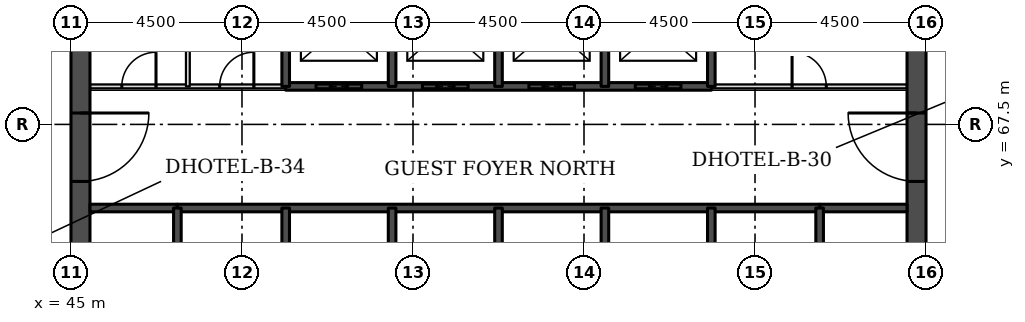
"""IFC4 building model, lengths in metres.
Left out: names, types, materials, properties, quantities, classifications, styles, units other than length and angle.
Written with IfcOpenShell. Run it as: python <this file> out.ifc"""

import sys

from ifc_helpers import new_model, si_unit, direction, frame, frame_2d, origin, place, context, subcontext, project, spatial, rectangle, extrude, element, fill, save


model = new_model("IFC4")
c1 = context("Model", 3, precision=1e-05, world=origin(), true_north=direction((0.0, 1.0)))
c2 = subcontext(c1, "Body", "Model", "MODEL_VIEW")
j1 = project(units=[si_unit("LENGTHUNIT", "METRE"), si_unit("PLANEANGLEUNIT", "RADIAN")], contexts=[c1])
p1 = place(None, origin())
s1 = spatial("IfcSite", under=j1, at=p1, CompositionType="ELEMENT")
p2 = place(p1, origin())
s2 = spatial("IfcBuilding", under=s1, at=p2, CompositionType="ELEMENT")
p3 = place(p2, frame((0.0, 0.0, 52.8)))
s3 = spatial("IfcBuildingStorey", under=s2, at=p3, CompositionType="ELEMENT", Elevation=52.8)
p4 = place(p3, frame((45.25, 49.5, 0.0), z_axis=(0.0, 0.0, 1.0), x_axis=(0.0, 1.0, 0.0)))
e1 = element("IfcWall", 1, at=p4, inside=s3, PredefinedType="SHEAR", context=c2, shape_type="SweptSolid", body=[
    extrude(rectangle(XDim=22.5, YDim=0.5, at=frame_2d((11.25, 0.0))), origin(), (0.0, 0.0, 1.0), 3.3),
])
p5 = place(p4, frame((4.2, 0.0, 0.0)))
e2 = element("IfcOpeningElement", 2, at=p5, cuts=e1, PredefinedType="OPENING", context=c2, shape_type="SweptSolid", body=[
    extrude(rectangle(XDim=1.8, YDim=2.1, at=frame_2d((0.9, 1.05))), frame((0.0, 0.26, 0.0), z_axis=(0.0, -1.0, 0.0), x_axis=(1.0, 0.0, 0.0)), (0.0, 0.0, 1.0), 0.52),
])
p6 = place(p4, frame((6.9, 0.0, 0.0)))
e3 = element("IfcOpeningElement", 3, at=p6, cuts=e1, PredefinedType="OPENING", context=c2, shape_type="SweptSolid", body=[
    extrude(rectangle(XDim=1.1, YDim=2.1, at=frame_2d((0.55, 1.05))), frame((0.0, 0.26, 0.0), z_axis=(0.0, -1.0, 0.0), x_axis=(1.0, 0.0, 0.0)), (0.0, 0.0, 1.0), 0.52),
])
p7 = place(p4, frame((13.6, 0.0, 0.0)))
e4 = element("IfcOpeningElement", 4, at=p7, cuts=e1, PredefinedType="OPENING", context=c2, shape_type="SweptSolid", body=[
    extrude(rectangle(XDim=1.1, YDim=2.1, at=frame_2d((0.55, 1.05))), frame((0.0, 0.26, 0.0), z_axis=(0.0, -1.0, 0.0), x_axis=(1.0, 0.0, 0.0)), (0.0, 0.0, 1.0), 0.52),
])
p8 = place(p4, frame((16.5, 0.0, 0.0)))
e5 = element("IfcOpeningElement", 5, at=p8, cuts=e1, PredefinedType="OPENING", context=c2, shape_type="SweptSolid", body=[
    extrude(rectangle(XDim=1.8, YDim=2.1, at=frame_2d((0.9, 1.05))), frame((0.0, 0.26, 0.0), z_axis=(0.0, -1.0, 0.0), x_axis=(1.0, 0.0, 0.0)), (0.0, 0.0, 1.0), 0.52),
])
p9 = place(p3, frame((67.25, 49.5, 0.0), z_axis=(0.0, 0.0, 1.0), x_axis=(0.0, 1.0, 0.0)))
e6 = element("IfcWall", 6, at=p9, inside=s3, PredefinedType="SHEAR", context=c2, shape_type="SweptSolid", body=[
    extrude(rectangle(XDim=22.5, YDim=0.5, at=frame_2d((11.25, 0.0))), origin(), (0.0, 0.0, 1.0), 3.3),
])
p10 = place(p9, frame((4.2, 0.0, 0.0)))
e7 = element("IfcOpeningElement", 7, at=p10, cuts=e6, PredefinedType="OPENING", context=c2, shape_type="SweptSolid", body=[
    extrude(rectangle(XDim=1.8, YDim=2.1, at=frame_2d((0.9, 1.05))), frame((0.0, 0.26, 0.0), z_axis=(0.0, -1.0, 0.0), x_axis=(1.0, 0.0, 0.0)), (0.0, 0.0, 1.0), 0.52),
])
p11 = place(p9, frame((6.9, 0.0, 0.0)))
e8 = element("IfcOpeningElement", 8, at=p11, cuts=e6, PredefinedType="OPENING", context=c2, shape_type="SweptSolid", body=[
    extrude(rectangle(XDim=1.1, YDim=2.1, at=frame_2d((0.55, 1.05))), frame((0.0, 0.26, 0.0), z_axis=(0.0, -1.0, 0.0), x_axis=(1.0, 0.0, 0.0)), (0.0, 0.0, 1.0), 0.52),
])
p12 = place(p9, frame((13.6, 0.0, 0.0)))
e9 = element("IfcOpeningElement", 9, at=p12, cuts=e6, PredefinedType="OPENING", context=c2, shape_type="SweptSolid", body=[
    extrude(rectangle(XDim=1.1, YDim=2.1, at=frame_2d((0.55, 1.05))), frame((0.0, 0.26, 0.0), z_axis=(0.0, -1.0, 0.0), x_axis=(1.0, 0.0, 0.0)), (0.0, 0.0, 1.0), 0.52),
])
p13 = place(p9, frame((16.5, 0.0, 0.0)))
e10 = element("IfcOpeningElement", 10, at=p13, cuts=e6, PredefinedType="OPENING", context=c2, shape_type="SweptSolid", body=[
    extrude(rectangle(XDim=1.8, YDim=2.1, at=frame_2d((0.9, 1.05))), frame((0.0, 0.26, 0.0), z_axis=(0.0, -1.0, 0.0), x_axis=(1.0, 0.0, 0.0)), (0.0, 0.0, 1.0), 0.52),
])
for number, where, z_axis, x_axis in (
    (11, (45.5, 65.3, 0.0), (0.0, 0.0, 1.0), (1.0, 0.0, 0.0)),
    (12, (64.7, 65.3, 0.0), (0.0, 0.0, 1.0), (1.0, 0.0, 0.0)),
):
    element("IfcWall", number, at=place(p3, frame(where, z_axis=z_axis, x_axis=x_axis)), inside=s3, PredefinedType="SOLIDWALL", context=c2, shape_type="SweptSolid", body=[
        extrude(rectangle(XDim=2.3, YDim=0.2, at=frame_2d((1.15, 0.0))), origin(), (0.0, 0.0, 1.0), 3.08),
    ])
p14 = place(p3, frame((47.8, 65.3, 0.0), z_axis=(0.0, 0.0, 1.0), x_axis=(1.0, 0.0, 0.0)))
e13 = element("IfcWall", 13, at=p14, inside=s3, PredefinedType="SOLIDWALL", context=c2, shape_type="SweptSolid", body=[
    extrude(rectangle(XDim=16.9, YDim=0.2, at=frame_2d((8.45, 0.0))), origin(), (0.0, 0.0, 1.0), 3.08),
])
p15 = place(p3, frame((45.5, 68.5, 0.0), z_axis=(0.0, 0.0, 1.0), x_axis=(1.0, 0.0, 0.0)))
e14 = element("IfcWall", 14, at=p15, inside=s3, PredefinedType="PARTITIONING", context=c2, shape_type="SweptSolid", body=[
    extrude(rectangle(XDim=5.15, YDim=0.1, at=frame_2d((2.575, 0.0))), origin(), (0.0, 0.0, 1.0), 3.08),
])
p16 = place(p15, frame((0.837, 0.0, 0.0)))
e15 = element("IfcOpeningElement", 15, at=p16, cuts=e14, PredefinedType="OPENING", context=c2, shape_type="SweptSolid", body=[
    extrude(rectangle(XDim=0.9, YDim=2.1, at=frame_2d((0.45, 1.05))), frame((0.0, 0.06, 0.0), z_axis=(0.0, -1.0, 0.0), x_axis=(1.0, 0.0, 0.0)), (0.0, 0.0, 1.0), 0.12),
])
p17 = place(p15, frame((3.413, 0.0, 0.0)))
e16 = element("IfcOpeningElement", 16, at=p17, cuts=e14, PredefinedType="OPENING", context=c2, shape_type="SweptSolid", body=[
    extrude(rectangle(XDim=0.9, YDim=2.1, at=frame_2d((0.45, 1.05))), frame((0.0, 0.06, 0.0), z_axis=(0.0, -1.0, 0.0), x_axis=(1.0, 0.0, 0.0)), (0.0, 0.0, 1.0), 0.12),
])
p18 = place(p3, frame((61.85, 68.5, 0.0), z_axis=(0.0, 0.0, 1.0), x_axis=(1.0, 0.0, 0.0)))
e17 = element("IfcWall", 17, at=p18, inside=s3, PredefinedType="PARTITIONING", context=c2, shape_type="SweptSolid", body=[
    extrude(rectangle(XDim=5.15, YDim=0.1, at=frame_2d((2.575, 0.0))), origin(), (0.0, 0.0, 1.0), 3.08),
])
p19 = place(p18, frame((2.125, 0.0, 0.0)))
e18 = element("IfcOpeningElement", 18, at=p19, cuts=e17, PredefinedType="OPENING", context=c2, shape_type="SweptSolid", body=[
    extrude(rectangle(XDim=0.9, YDim=2.1, at=frame_2d((0.45, 1.05))), frame((0.0, 0.06, 0.0), z_axis=(0.0, -1.0, 0.0), x_axis=(1.0, 0.0, 0.0)), (0.0, 0.0, 1.0), 0.12),
])
p20 = place(p3, frame((50.65, 68.5, 0.0), z_axis=(0.0, 0.0, 1.0), x_axis=(1.0, 0.0, 0.0)))
e19 = element("IfcWall", 19, at=p20, inside=s3, PredefinedType="SOLIDWALL", context=c2, shape_type="SweptSolid", body=[
    extrude(rectangle(XDim=11.2, YDim=0.2, at=frame_2d((5.6, 0.0))), origin(), (0.0, 0.0, 1.0), 3.08),
])
p21 = place(p20, frame((0.8, 0.0, 0.0)))
e20 = element("IfcOpeningElement", 20, at=p21, cuts=e19, PredefinedType="OPENING", context=c2, shape_type="SweptSolid", body=[
    extrude(rectangle(XDim=1.2, YDim=2.1, at=frame_2d((0.6, 1.05))), frame((0.0, 0.11, 0.0), z_axis=(0.0, -1.0, 0.0), x_axis=(1.0, 0.0, 0.0)), (0.0, 0.0, 1.0), 0.22),
])
p22 = place(p20, frame((3.6, 0.0, 0.0)))
e21 = element("IfcOpeningElement", 21, at=p22, cuts=e19, PredefinedType="OPENING", context=c2, shape_type="SweptSolid", body=[
    extrude(rectangle(XDim=1.2, YDim=2.1, at=frame_2d((0.6, 1.05))), frame((0.0, 0.11, 0.0), z_axis=(0.0, -1.0, 0.0), x_axis=(1.0, 0.0, 0.0)), (0.0, 0.0, 1.0), 0.22),
])
p23 = place(p20, frame((6.4, 0.0, 0.0)))
e22 = element("IfcOpeningElement", 22, at=p23, cuts=e19, PredefinedType="OPENING", context=c2, shape_type="SweptSolid", body=[
    extrude(rectangle(XDim=1.2, YDim=2.1, at=frame_2d((0.6, 1.05))), frame((0.0, 0.11, 0.0), z_axis=(0.0, -1.0, 0.0), x_axis=(1.0, 0.0, 0.0)), (0.0, 0.0, 1.0), 0.22),
])
p24 = place(p20, frame((9.2, 0.0, 0.0)))
e23 = element("IfcOpeningElement", 23, at=p24, cuts=e19, PredefinedType="OPENING", context=c2, shape_type="SweptSolid", body=[
    extrude(rectangle(XDim=1.2, YDim=2.1, at=frame_2d((0.6, 1.05))), frame((0.0, 0.11, 0.0), z_axis=(0.0, -1.0, 0.0), x_axis=(1.0, 0.0, 0.0)), (0.0, 0.0, 1.0), 0.22),
])
p25 = place(p3, frame((47.8, 62.0, 0.0), z_axis=(0.0, 0.0, 1.0), x_axis=(0.0, 1.0, 0.0)))
e24 = element("IfcWall", 24, at=p25, inside=s3, PredefinedType="SOLIDWALL", context=c2, shape_type="SweptSolid", body=[
    extrude(rectangle(XDim=3.3, YDim=0.2, at=frame_2d((1.65, 0.0))), origin(), (0.0, 0.0, 1.0), 3.08),
])
p26 = place(p25, frame((1.1, 0.0, 0.0)))
e25 = element("IfcOpeningElement", 25, at=p26, cuts=e24, PredefinedType="OPENING", context=c2, shape_type="SweptSolid", body=[
    extrude(rectangle(XDim=1.1, YDim=2.1, at=frame_2d((0.55, 1.05))), frame((0.0, 0.11, 0.0), z_axis=(0.0, -1.0, 0.0), x_axis=(1.0, 0.0, 0.0)), (0.0, 0.0, 1.0), 0.22),
])
p27 = place(p3, frame((48.075, 68.5, 0.0), z_axis=(0.0, 0.0, 1.0), x_axis=(0.0, 1.0, 0.0)))
e26 = element("IfcWall", 26, at=p27, inside=s3, PredefinedType="PARTITIONING", context=c2, shape_type="SweptSolid", body=[
    extrude(rectangle(XDim=3.0, YDim=0.1, at=frame_2d((1.5, 0.0))), origin(), (0.0, 0.0, 1.0), 3.08),
])
p28 = place(p3, frame((50.65, 62.0, 0.0), z_axis=(0.0, 0.0, 1.0), x_axis=(0.0, 1.0, 0.0)))
e27 = element("IfcWall", 27, at=p28, inside=s3, PredefinedType="SOLIDWALL", context=c2, shape_type="SweptSolid", body=[
    extrude(rectangle(XDim=3.3, YDim=0.2, at=frame_2d((1.65, 0.0))), origin(), (0.0, 0.0, 1.0), 3.08),
])
p29 = place(p3, frame((50.65, 68.5, 0.0), z_axis=(0.0, 0.0, 1.0), x_axis=(0.0, 1.0, 0.0)))
e28 = element("IfcWall", 28, at=p29, inside=s3, PredefinedType="SOLIDWALL", context=c2, shape_type="SweptSolid", body=[
    extrude(rectangle(XDim=3.0, YDim=0.2, at=frame_2d((1.5, 0.0))), origin(), (0.0, 0.0, 1.0), 3.08),
])
p30 = place(p3, frame((53.45, 62.5, 0.0), z_axis=(0.0, 0.0, 1.0), x_axis=(0.0, 1.0, 0.0)))
e29 = element("IfcWall", 29, at=p30, inside=s3, PredefinedType="SOLIDWALL", context=c2, shape_type="SweptSolid", body=[
    extrude(rectangle(XDim=2.8, YDim=0.2, at=frame_2d((1.4, 0.0))), origin(), (0.0, 0.0, 1.0), 3.08),
])
p31 = place(p3, frame((53.45, 68.5, 0.0), z_axis=(0.0, 0.0, 1.0), x_axis=(0.0, 1.0, 0.0)))
e30 = element("IfcWall", 30, at=p31, inside=s3, PredefinedType="SOLIDWALL", context=c2, shape_type="SweptSolid", body=[
    extrude(rectangle(XDim=3.0, YDim=0.2, at=frame_2d((1.5, 0.0))), origin(), (0.0, 0.0, 1.0), 3.08),
])
p32 = place(p3, frame((56.25, 62.5, 0.0), z_axis=(0.0, 0.0, 1.0), x_axis=(0.0, 1.0, 0.0)))
e31 = element("IfcWall", 31, at=p32, inside=s3, PredefinedType="SOLIDWALL", context=c2, shape_type="SweptSolid", body=[
    extrude(rectangle(XDim=2.8, YDim=0.2, at=frame_2d((1.4, 0.0))), origin(), (0.0, 0.0, 1.0), 3.08),
])
p33 = place(p3, frame((56.25, 68.5, 0.0), z_axis=(0.0, 0.0, 1.0), x_axis=(0.0, 1.0, 0.0)))
e32 = element("IfcWall", 32, at=p33, inside=s3, PredefinedType="SOLIDWALL", context=c2, shape_type="SweptSolid", body=[
    extrude(rectangle(XDim=3.0, YDim=0.2, at=frame_2d((1.5, 0.0))), origin(), (0.0, 0.0, 1.0), 3.08),
])
p34 = place(p3, frame((59.05, 62.5, 0.0), z_axis=(0.0, 0.0, 1.0), x_axis=(0.0, 1.0, 0.0)))
e33 = element("IfcWall", 33, at=p34, inside=s3, PredefinedType="SOLIDWALL", context=c2, shape_type="SweptSolid", body=[
    extrude(rectangle(XDim=2.8, YDim=0.2, at=frame_2d((1.4, 0.0))), origin(), (0.0, 0.0, 1.0), 3.08),
])
p35 = place(p3, frame((59.05, 68.5, 0.0), z_axis=(0.0, 0.0, 1.0), x_axis=(0.0, 1.0, 0.0)))
e34 = element("IfcWall", 34, at=p35, inside=s3, PredefinedType="SOLIDWALL", context=c2, shape_type="SweptSolid", body=[
    extrude(rectangle(XDim=3.0, YDim=0.2, at=frame_2d((1.5, 0.0))), origin(), (0.0, 0.0, 1.0), 3.08),
])
p36 = place(p3, frame((61.85, 62.0, 0.0), z_axis=(0.0, 0.0, 1.0), x_axis=(0.0, 1.0, 0.0)))
e35 = element("IfcWall", 35, at=p36, inside=s3, PredefinedType="SOLIDWALL", context=c2, shape_type="SweptSolid", body=[
    extrude(rectangle(XDim=3.3, YDim=0.2, at=frame_2d((1.65, 0.0))), origin(), (0.0, 0.0, 1.0), 3.08),
])
p37 = place(p3, frame((61.85, 68.5, 0.0), z_axis=(0.0, 0.0, 1.0), x_axis=(0.0, 1.0, 0.0)))
e36 = element("IfcWall", 36, at=p37, inside=s3, PredefinedType="SOLIDWALL", context=c2, shape_type="SweptSolid", body=[
    extrude(rectangle(XDim=3.0, YDim=0.2, at=frame_2d((1.5, 0.0))), origin(), (0.0, 0.0, 1.0), 3.08),
])
p38 = place(p3, frame((64.7, 62.0, 0.0), z_axis=(0.0, 0.0, 1.0), x_axis=(0.0, 1.0, 0.0)))
e37 = element("IfcWall", 37, at=p38, inside=s3, PredefinedType="SOLIDWALL", context=c2, shape_type="SweptSolid", body=[
    extrude(rectangle(XDim=3.3, YDim=0.2, at=frame_2d((1.65, 0.0))), origin(), (0.0, 0.0, 1.0), 3.08),
])
p39 = place(p38, frame((1.1, 0.0, 0.0)))
e38 = element("IfcOpeningElement", 38, at=p39, cuts=e37, PredefinedType="OPENING", context=c2, shape_type="SweptSolid", body=[
    extrude(rectangle(XDim=1.1, YDim=2.1, at=frame_2d((0.55, 1.05))), frame((0.0, 0.11, 0.0), z_axis=(0.0, -1.0, 0.0), x_axis=(1.0, 0.0, 0.0)), (0.0, 0.0, 1.0), 0.22),
])
p40 = place(p21, origin())
e39 = element("IfcDoor", 39, at=p40, inside=s3, OperationType="DOUBLE_DOOR_SLIDING", PredefinedType="DOOR", context=c2, shape_type="SweptSolid", body=[
    extrude(rectangle(XDim=1.2, YDim=2.1, at=frame_2d((0.6, 1.05))), frame((0.0, 0.025, 0.0), z_axis=(0.0, -1.0, 0.0), x_axis=(1.0, 0.0, 0.0)), (0.0, 0.0, 1.0), 0.05),
])
fill(e20, e39)
p41 = place(p22, origin())
e40 = element("IfcDoor", 40, at=p41, inside=s3, OperationType="DOUBLE_DOOR_SLIDING", PredefinedType="DOOR", context=c2, shape_type="SweptSolid", body=[
    extrude(rectangle(XDim=1.2, YDim=2.1, at=frame_2d((0.6, 1.05))), frame((0.0, 0.025, 0.0), z_axis=(0.0, -1.0, 0.0), x_axis=(1.0, 0.0, 0.0)), (0.0, 0.0, 1.0), 0.05),
])
fill(e21, e40)
p42 = place(p23, origin())
e41 = element("IfcDoor", 41, at=p42, inside=s3, OperationType="DOUBLE_DOOR_SLIDING", PredefinedType="DOOR", context=c2, shape_type="SweptSolid", body=[
    extrude(rectangle(XDim=1.2, YDim=2.1, at=frame_2d((0.6, 1.05))), frame((0.0, 0.025, 0.0), z_axis=(0.0, -1.0, 0.0), x_axis=(1.0, 0.0, 0.0)), (0.0, 0.0, 1.0), 0.05),
])
fill(e22, e41)
p43 = place(p24, origin())
e42 = element("IfcDoor", 42, at=p43, inside=s3, OperationType="DOUBLE_DOOR_SLIDING", PredefinedType="DOOR", context=c2, shape_type="SweptSolid", body=[
    extrude(rectangle(XDim=1.2, YDim=2.1, at=frame_2d((0.6, 1.05))), frame((0.0, 0.025, 0.0), z_axis=(0.0, -1.0, 0.0), x_axis=(1.0, 0.0, 0.0)), (0.0, 0.0, 1.0), 0.05),
])
fill(e23, e42)
p44 = place(p8, frame((1.8, 0.0, 0.0), z_axis=(0.0, 0.0, 1.0), x_axis=(-1.0, 0.0, 0.0)))
e43 = element("IfcDoor", 43, at=p44, inside=s3, OperationType="SINGLE_SWING_LEFT", PredefinedType="DOOR", context=c2, shape_type="SweptSolid", body=[
    extrude(rectangle(XDim=1.8, YDim=2.1, at=frame_2d((0.9, 1.05))), frame((0.0, 0.025, 0.0), z_axis=(0.0, -1.0, 0.0), x_axis=(1.0, 0.0, 0.0)), (0.0, 0.0, 1.0), 0.05),
])
fill(e5, e43)
p45 = place(p13, origin())
e44 = element("IfcDoor", 44, at=p45, inside=s3, OperationType="SINGLE_SWING_RIGHT", PredefinedType="DOOR", context=c2, shape_type="SweptSolid", body=[
    extrude(rectangle(XDim=1.8, YDim=2.1, at=frame_2d((0.9, 1.05))), frame((0.0, 0.025, 0.0), z_axis=(0.0, -1.0, 0.0), x_axis=(1.0, 0.0, 0.0)), (0.0, 0.0, 1.0), 0.05),
])
fill(e10, e44)
p46 = place(p19, origin())
e45 = element("IfcDoor", 45, at=p46, inside=s3, OperationType="SINGLE_SWING_LEFT", PredefinedType="DOOR", context=c2, shape_type="SweptSolid", body=[
    extrude(rectangle(XDim=0.9, YDim=2.1, at=frame_2d((0.45, 1.05))), frame((0.0, 0.025, 0.0), z_axis=(0.0, -1.0, 0.0), x_axis=(1.0, 0.0, 0.0)), (0.0, 0.0, 1.0), 0.05),
])
fill(e18, e45)
p47 = place(p16, origin())
e46 = element("IfcDoor", 46, at=p47, inside=s3, OperationType="SINGLE_SWING_RIGHT", PredefinedType="DOOR", context=c2, shape_type="SweptSolid", body=[
    extrude(rectangle(XDim=0.9, YDim=2.1, at=frame_2d((0.45, 1.05))), frame((0.0, 0.025, 0.0), z_axis=(0.0, -1.0, 0.0), x_axis=(1.0, 0.0, 0.0)), (0.0, 0.0, 1.0), 0.05),
])
fill(e15, e46)
p48 = place(p17, origin())
e47 = element("IfcDoor", 47, at=p48, inside=s3, OperationType="SINGLE_SWING_RIGHT", PredefinedType="DOOR", context=c2, shape_type="SweptSolid", body=[
    extrude(rectangle(XDim=0.9, YDim=2.1, at=frame_2d((0.45, 1.05))), frame((0.0, 0.025, 0.0), z_axis=(0.0, -1.0, 0.0), x_axis=(1.0, 0.0, 0.0)), (0.0, 0.0, 1.0), 0.05),
])
fill(e16, e47)
save(model, sys.argv[1])
